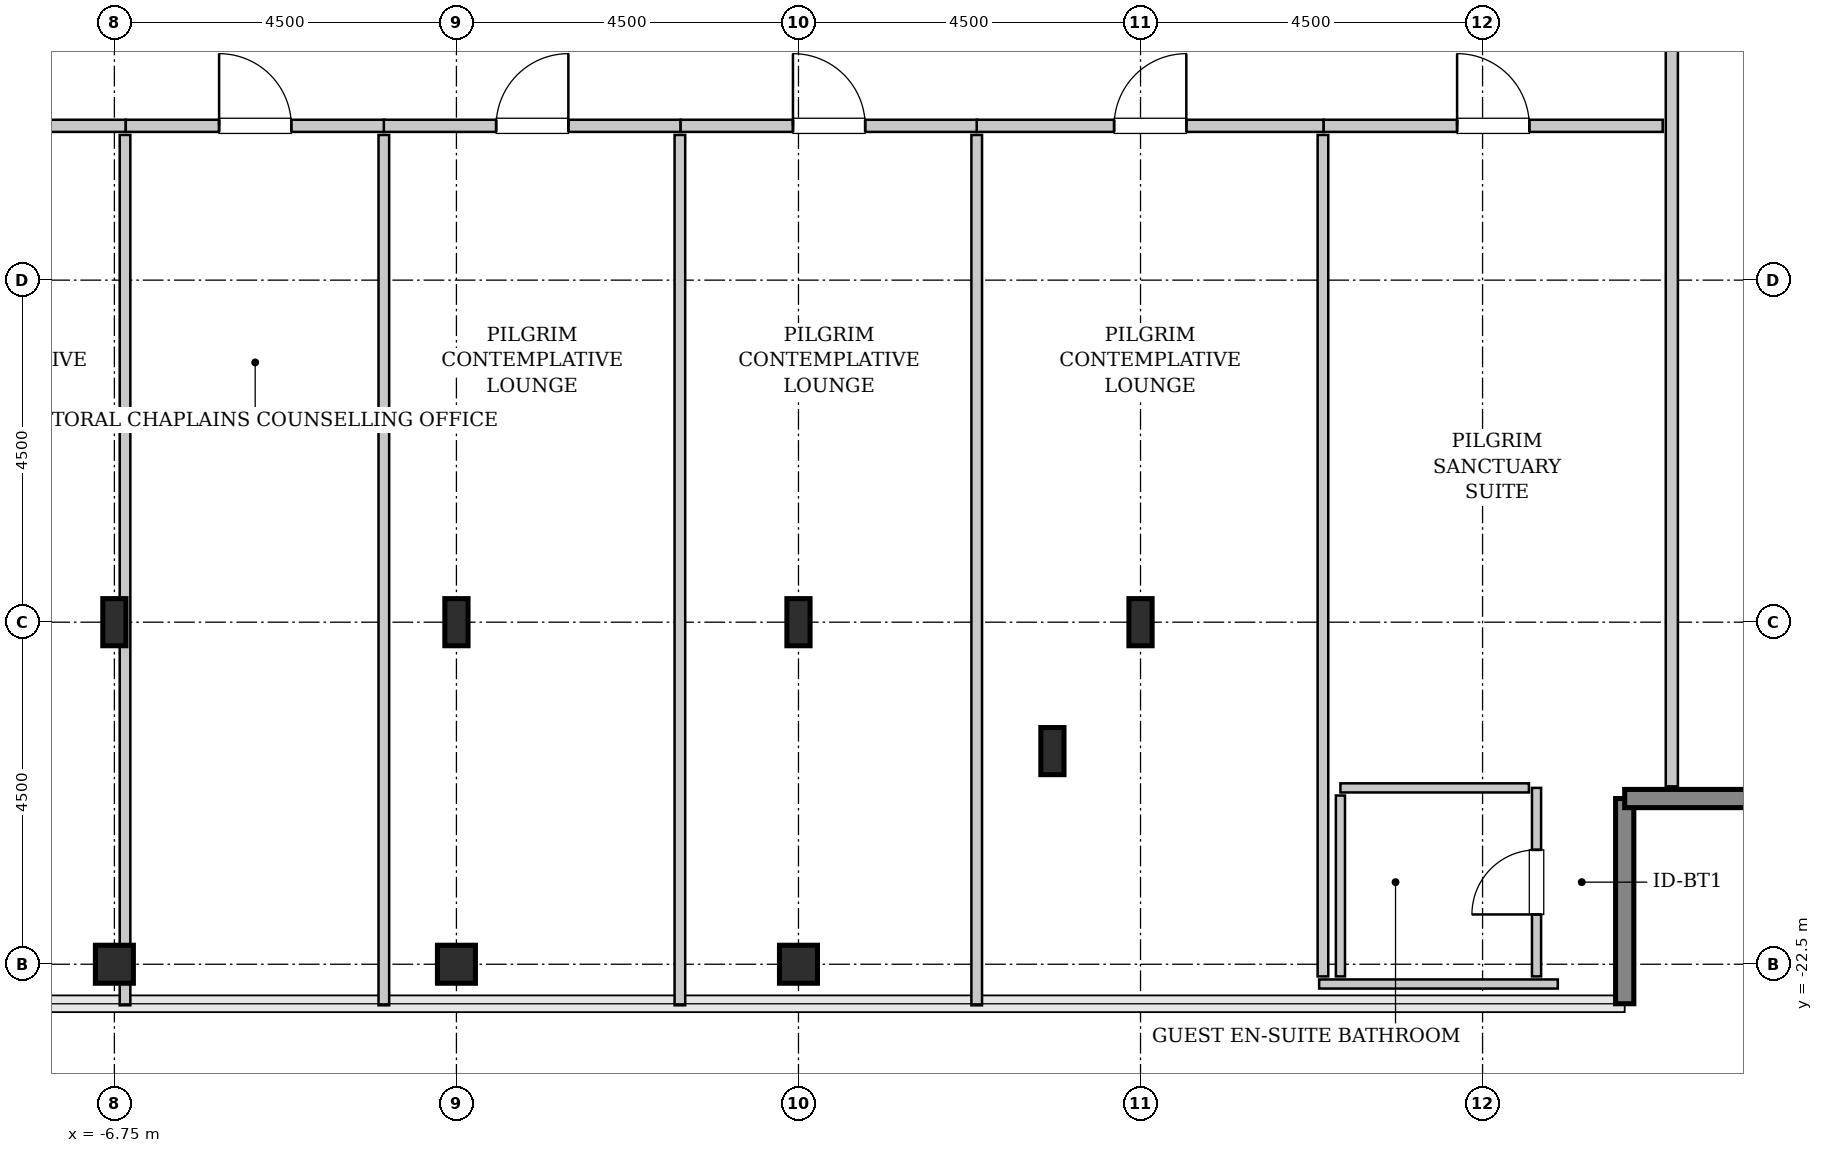
"""IFC4 building model, lengths in metres.
Left out: names, types, materials, properties, quantities, classifications, styles, units other than length and angle.
Written with IfcOpenShell. Run it as: python <this file> out.ifc"""

import sys

from ifc_helpers import new_model, si_unit, direction, frame, frame_2d, origin, origin_2d, place, context, subcontext, project, spatial, rectangle, hollow_rectangle, i_section, extrude, source, transform, mapped, element, fill, save


model = new_model("IFC4")
c1 = context("Model", 3, precision=1e-05, world=origin(), true_north=direction((0.0, 1.0)))
c2 = subcontext(c1, "Body", "Model", "MODEL_VIEW")
j1 = project(units=[si_unit("LENGTHUNIT", "METRE"), si_unit("PLANEANGLEUNIT", "RADIAN")], contexts=[c1])
p1 = place(None, origin())
s1 = spatial("IfcSite", under=j1, at=p1, CompositionType="ELEMENT")
p2 = place(p1, origin())
s2 = spatial("IfcBuilding", under=s1, at=p2, CompositionType="ELEMENT")
p3 = place(p2, frame((0.0, 0.0, 314.0)))
s3 = spatial("IfcBuildingStorey", under=s2, at=p3, CompositionType="ELEMENT", Elevation=314.0)
m1 = source(origin(), c2, "Body", "SweptSolid", [
    extrude(hollow_rectangle(XDim=0.5, YDim=0.5, WallThickness=0.025, InnerFilletRadius=0.025, OuterFilletRadius=0.05, at=origin_2d()), origin(), (0.0, 0.0, 1.0), 3.8),
])
p4 = place(p3, frame((-6.75, -22.5, 0.0), z_axis=(0.0, 0.0, 1.0), x_axis=(1.0, 0.0, 0.0)))
e1 = element("IfcColumn", 1, at=p4, inside=s3, PredefinedType="COLUMN", context=c2, shape_type="MappedRepresentation", body=[
    mapped(m1, transform((0.0, 0.0, 0.0), x_axis=(1.0, 0.0, 0.0), y_axis=(0.0, 1.0, 0.0), z_axis=(0.0, 0.0, 1.0), scale=1.0)),
])
m2 = source(origin(), c2, "Body", "SweptSolid", [
    extrude(i_section(OverallWidth=0.305, OverallDepth=0.62, WebThickness=0.021, FlangeThickness=0.04, FilletRadius=0.027, at=origin_2d()), origin(), (0.0, 0.0, 1.0), 3.8),
])
p5 = place(p3, frame((-6.75, -18.0, 0.0), z_axis=(0.0, 0.0, 1.0), x_axis=(1.0, 0.0, 0.0)))
e2 = element("IfcColumn", 2, at=p5, inside=s3, PredefinedType="COLUMN", context=c2, shape_type="MappedRepresentation", body=[
    mapped(m2, transform((0.0, 0.0, 0.0), x_axis=(1.0, 0.0, 0.0), y_axis=(0.0, 1.0, 0.0), z_axis=(0.0, 0.0, 1.0), scale=1.0)),
])
p6 = place(p3, frame((-2.25, -22.5, 0.0), z_axis=(0.0, 0.0, 1.0), x_axis=(1.0, 0.0, 0.0)))
e3 = element("IfcColumn", 3, at=p6, inside=s3, PredefinedType="COLUMN", context=c2, shape_type="MappedRepresentation", body=[
    mapped(m1, transform((0.0, 0.0, 0.0), x_axis=(1.0, 0.0, 0.0), y_axis=(0.0, 1.0, 0.0), z_axis=(0.0, 0.0, 1.0), scale=1.0)),
])
p7 = place(p3, frame((-2.25, -18.0, 0.0), z_axis=(0.0, 0.0, 1.0), x_axis=(1.0, 0.0, 0.0)))
e4 = element("IfcColumn", 4, at=p7, inside=s3, PredefinedType="COLUMN", context=c2, shape_type="MappedRepresentation", body=[
    mapped(m2, transform((0.0, 0.0, 0.0), x_axis=(1.0, 0.0, 0.0), y_axis=(0.0, 1.0, 0.0), z_axis=(0.0, 0.0, 1.0), scale=1.0)),
])
p8 = place(p3, frame((2.25, -22.5, 0.0), z_axis=(0.0, 0.0, 1.0), x_axis=(1.0, 0.0, 0.0)))
e5 = element("IfcColumn", 5, at=p8, inside=s3, PredefinedType="COLUMN", context=c2, shape_type="MappedRepresentation", body=[
    mapped(m1, transform((0.0, 0.0, 0.0), x_axis=(1.0, 0.0, 0.0), y_axis=(0.0, 1.0, 0.0), z_axis=(0.0, 0.0, 1.0), scale=1.0)),
])
for number, where, z_axis, x_axis in (
    (6, (2.25, -18.0, 0.0), (0.0, 0.0, 1.0), (1.0, 0.0, 0.0)),
    (7, (5.591, -19.696, 0.0), (0.0, 0.0, 1.0), (1.0, 0.0, 0.0)),
    (8, (6.75, -18.0, 0.0), (0.0, 0.0, 1.0), (1.0, 0.0, 0.0)),
):
    element("IfcColumn", number, at=place(p3, frame(where, z_axis=z_axis, x_axis=x_axis)), inside=s3, PredefinedType="COLUMN", context=c2, shape_type="MappedRepresentation", body=[
        mapped(m2, transform((0.0, 0.0, 0.0), x_axis=(1.0, 0.0, 0.0), y_axis=(0.0, 1.0, 0.0), z_axis=(0.0, 0.0, 1.0), scale=1.0)),
    ])
m3 = source(origin(), c2, "Body", "SweptSolid", [
    extrude(rectangle(XDim=2.7, YDim=0.24, at=frame_2d((1.35, 0.0))), origin(), (0.0, 0.0, 1.0), 3.5),
])
for number, where, z_axis, x_axis in (
    (9, (13.12, -23.02, 0.0), (0.0, 0.0, 1.0), (0.0, 1.0, 0.0)),
    (10, (13.12, -20.32, 0.0), (0.0, 0.0, 1.0), (1.0, 0.0, 0.0)),
):
    element("IfcWall", number, at=place(p3, frame(where, z_axis=z_axis, x_axis=x_axis)), inside=s3, PredefinedType="SHEAR", context=c2, shape_type="MappedRepresentation", body=[
        mapped(m3, transform((0.0, 0.0, 0.0), x_axis=(1.0, 0.0, 0.0), y_axis=(0.0, 1.0, 0.0), z_axis=(0.0, 0.0, 1.0), scale=1.0)),
    ])
m4 = source(origin(), c2, "Body", "SweptSolid", [
    extrude(rectangle(XDim=3.14, YDim=0.12, at=frame_2d((1.57, 0.0))), origin(), (0.0, 0.0, 1.0), 3.485),
])
p9 = place(p3, frame((9.1, -22.76, 0.0), z_axis=(0.0, 0.0, 1.0), x_axis=(1.0, 0.0, 0.0)))
e11 = element("IfcWall", 11, at=p9, inside=s3, PredefinedType="PLUMBINGWALL", context=c2, shape_type="MappedRepresentation", body=[
    mapped(m4, transform((0.0, 0.0, 0.0), x_axis=(1.0, 0.0, 0.0), y_axis=(0.0, 1.0, 0.0), z_axis=(0.0, 0.0, 1.0), scale=1.0)),
])
m5 = source(origin(), c2, "Body", "SweptSolid", [
    extrude(rectangle(XDim=2.48, YDim=0.12, at=frame_2d((1.24, 0.0))), origin(), (0.0, 0.0, 1.0), 3.485),
])
p10 = place(p3, frame((11.96, -22.66, 0.0), z_axis=(0.0, 0.0, 1.0), x_axis=(0.0, 1.0, 0.0)))
e12 = element("IfcWall", 12, at=p10, inside=s3, PredefinedType="PLUMBINGWALL", context=c2, shape_type="MappedRepresentation", body=[
    mapped(m5, transform((0.0, 0.0, 0.0), x_axis=(1.0, 0.0, 0.0), y_axis=(0.0, 1.0, 0.0), z_axis=(0.0, 0.0, 1.0), scale=1.0)),
])
p11 = place(p10, frame((0.815, 0.0, 0.0)))
e13 = element("IfcOpeningElement", 13, at=p11, cuts=e12, PredefinedType="OPENING", context=c2, shape_type="SweptSolid", body=[
    extrude(rectangle(XDim=0.85, YDim=2.1, at=frame_2d((0.425, 1.05))), frame((0.0, 0.07, 0.0), z_axis=(0.0, -1.0, 0.0), x_axis=(1.0, 0.0, 0.0)), (0.0, 0.0, 1.0), 0.14),
])
m6 = source(origin(), c2, "Body", "SweptSolid", [
    extrude(rectangle(XDim=2.48, YDim=0.12, at=frame_2d((1.24, 0.0))), origin(), (0.0, 0.0, 1.0), 3.485),
])
p12 = place(p3, frame((9.38, -20.18, 0.0), z_axis=(0.0, 0.0, 1.0), x_axis=(1.0, 0.0, 0.0)))
e14 = element("IfcWall", 14, at=p12, inside=s3, PredefinedType="PLUMBINGWALL", context=c2, shape_type="MappedRepresentation", body=[
    mapped(m6, transform((0.0, 0.0, 0.0), x_axis=(1.0, 0.0, 0.0), y_axis=(0.0, 1.0, 0.0), z_axis=(0.0, 0.0, 1.0), scale=1.0)),
])
m7 = source(origin(), c2, "Body", "SweptSolid", [
    extrude(rectangle(XDim=2.38, YDim=0.12, at=frame_2d((1.19, 0.0))), origin(), (0.0, 0.0, 1.0), 3.485),
])
p13 = place(p3, frame((9.38, -22.66, 0.0), z_axis=(0.0, 0.0, 1.0), x_axis=(0.0, 1.0, 0.0)))
e15 = element("IfcWall", 15, at=p13, inside=s3, PredefinedType="PLUMBINGWALL", context=c2, shape_type="MappedRepresentation", body=[
    mapped(m7, transform((0.0, 0.0, 0.0), x_axis=(1.0, 0.0, 0.0), y_axis=(0.0, 1.0, 0.0), z_axis=(0.0, 0.0, 1.0), scale=1.0)),
])
m8 = source(origin(), c2, "Body", "SweptSolid", [
    extrude(rectangle(XDim=11.965, YDim=0.16, at=frame_2d((5.982, 0.0))), origin(), (0.0, 0.0, 1.0), 3.485),
])
p14 = place(p3, frame((13.74, -20.16, 0.0), z_axis=(0.0, 0.0, 1.0), x_axis=(0.0, 1.0, 0.0)))
e16 = element("IfcWall", 16, at=p14, inside=s3, PredefinedType="PARTITIONING", context=c2, shape_type="MappedRepresentation", body=[
    mapped(m8, transform((0.0, 0.0, 0.0), x_axis=(1.0, 0.0, 0.0), y_axis=(0.0, 1.0, 0.0), z_axis=(0.0, 0.0, 1.0), scale=1.0)),
])
p15 = place(p14, frame((9.833, 0.0, 0.0)))
e17 = element("IfcOpeningElement", 17, at=p15, cuts=e16, PredefinedType="OPENING", context=c2, shape_type="SweptSolid", body=[
    extrude(rectangle(XDim=0.95, YDim=2.1, at=frame_2d((0.475, 1.05))), frame((0.0, 0.09, 0.0), z_axis=(0.0, -1.0, 0.0), x_axis=(1.0, 0.0, 0.0)), (0.0, 0.0, 1.0), 0.18),
])
m9 = source(origin(), c2, "Body", "SweptSolid", [
    extrude(rectangle(XDim=3.405, YDim=0.16, at=frame_2d((1.702, 0.0))), origin(), (0.0, 0.0, 1.0), 3.485),
])
p16 = place(p3, frame((-10.005, -11.47, 0.0), z_axis=(0.0, 0.0, 1.0), x_axis=(1.0, 0.0, 0.0)))
e18 = element("IfcWall", 18, at=p16, inside=s3, PredefinedType="PARTITIONING", context=c2, shape_type="MappedRepresentation", body=[
    mapped(m9, transform((0.0, 0.0, 0.0), x_axis=(1.0, 0.0, 0.0), y_axis=(0.0, 1.0, 0.0), z_axis=(0.0, 0.0, 1.0), scale=1.0)),
])
p17 = place(p16, frame((1.228, 0.0, 0.0)))
e19 = element("IfcOpeningElement", 19, at=p17, cuts=e18, PredefinedType="OPENING", context=c2, shape_type="SweptSolid", body=[
    extrude(rectangle(XDim=0.95, YDim=2.1, at=frame_2d((0.475, 1.05))), frame((0.0, 0.09, 0.0), z_axis=(0.0, -1.0, 0.0), x_axis=(1.0, 0.0, 0.0)), (0.0, 0.0, 1.0), 0.18),
])
m10 = source(origin(), c2, "Body", "SweptSolid", [
    extrude(rectangle(XDim=11.45, YDim=0.14, at=frame_2d((5.725, 0.0))), origin(), (0.0, 0.0, 1.0), 2.925),
])
p18 = place(p3, frame((-6.61, -23.04, 0.0), z_axis=(0.0, 0.0, 1.0), x_axis=(0.0, 1.0, 0.0)))
e20 = element("IfcWall", 20, at=p18, inside=s3, PredefinedType="PARTITIONING", context=c2, shape_type="MappedRepresentation", body=[
    mapped(m10, transform((0.0, 0.0, 0.0), x_axis=(1.0, 0.0, 0.0), y_axis=(0.0, 1.0, 0.0), z_axis=(0.0, 0.0, 1.0), scale=1.0)),
])
m11 = source(origin(), c2, "Body", "SweptSolid", [
    extrude(rectangle(XDim=3.405, YDim=0.16, at=frame_2d((1.703, 0.0))), origin(), (0.0, 0.0, 1.0), 3.485),
])
p19 = place(p3, frame((-6.6, -11.47, 0.0), z_axis=(0.0, 0.0, 1.0), x_axis=(1.0, 0.0, 0.0)))
e21 = element("IfcWall", 21, at=p19, inside=s3, PredefinedType="PARTITIONING", context=c2, shape_type="MappedRepresentation", body=[
    mapped(m11, transform((0.0, 0.0, 0.0), x_axis=(1.0, 0.0, 0.0), y_axis=(0.0, 1.0, 0.0), z_axis=(0.0, 0.0, 1.0), scale=1.0)),
])
p20 = place(p19, frame((1.228, 0.0, 0.0)))
e22 = element("IfcOpeningElement", 22, at=p20, cuts=e21, PredefinedType="OPENING", context=c2, shape_type="SweptSolid", body=[
    extrude(rectangle(XDim=0.95, YDim=2.1, at=frame_2d((0.475, 1.05))), frame((0.0, 0.09, 0.0), z_axis=(0.0, -1.0, 0.0), x_axis=(1.0, 0.0, 0.0)), (0.0, 0.0, 1.0), 0.18),
])
m12 = source(origin(), c2, "Body", "SweptSolid", [
    extrude(rectangle(XDim=11.45, YDim=0.14, at=frame_2d((5.725, 0.0))), origin(), (0.0, 0.0, 1.0), 3.485),
])
p21 = place(p3, frame((-3.205, -23.04, 0.0), z_axis=(0.0, 0.0, 1.0), x_axis=(0.0, 1.0, 0.0)))
e23 = element("IfcWall", 23, at=p21, inside=s3, PredefinedType="PARTITIONING", context=c2, shape_type="MappedRepresentation", body=[
    mapped(m12, transform((0.0, 0.0, 0.0), x_axis=(1.0, 0.0, 0.0), y_axis=(0.0, 1.0, 0.0), z_axis=(0.0, 0.0, 1.0), scale=1.0)),
])
m13 = source(origin(), c2, "Body", "SweptSolid", [
    extrude(rectangle(XDim=3.905, YDim=0.16, at=frame_2d((1.953, 0.0))), origin(), (0.0, 0.0, 1.0), 3.485),
])
p22 = place(p3, frame((-3.205, -11.47, 0.0), z_axis=(0.0, 0.0, 1.0), x_axis=(1.0, 0.0, 0.0)))
e24 = element("IfcWall", 24, at=p22, inside=s3, PredefinedType="PARTITIONING", context=c2, shape_type="MappedRepresentation", body=[
    mapped(m13, transform((0.0, 0.0, 0.0), x_axis=(1.0, 0.0, 0.0), y_axis=(0.0, 1.0, 0.0), z_axis=(0.0, 0.0, 1.0), scale=1.0)),
])
p23 = place(p22, frame((1.478, 0.0, 0.0)))
e25 = element("IfcOpeningElement", 25, at=p23, cuts=e24, PredefinedType="OPENING", context=c2, shape_type="SweptSolid", body=[
    extrude(rectangle(XDim=0.95, YDim=2.1, at=frame_2d((0.475, 1.05))), frame((0.0, 0.09, 0.0), z_axis=(0.0, -1.0, 0.0), x_axis=(1.0, 0.0, 0.0)), (0.0, 0.0, 1.0), 0.18),
])
p24 = place(p3, frame((0.69, -23.04, 0.0), z_axis=(0.0, 0.0, 1.0), x_axis=(0.0, 1.0, 0.0)))
e26 = element("IfcWall", 26, at=p24, inside=s3, PredefinedType="PARTITIONING", context=c2, shape_type="MappedRepresentation", body=[
    mapped(m12, transform((0.0, 0.0, 0.0), x_axis=(1.0, 0.0, 0.0), y_axis=(0.0, 1.0, 0.0), z_axis=(0.0, 0.0, 1.0), scale=1.0)),
])
p25 = place(p3, frame((0.7, -11.47, 0.0), z_axis=(0.0, 0.0, 1.0), x_axis=(1.0, 0.0, 0.0)))
e27 = element("IfcWall", 27, at=p25, inside=s3, PredefinedType="PARTITIONING", context=c2, shape_type="MappedRepresentation", body=[
    mapped(m13, transform((0.0, 0.0, 0.0), x_axis=(1.0, 0.0, 0.0), y_axis=(0.0, 1.0, 0.0), z_axis=(0.0, 0.0, 1.0), scale=1.0)),
])
p26 = place(p25, frame((1.478, 0.0, 0.0)))
e28 = element("IfcOpeningElement", 28, at=p26, cuts=e27, PredefinedType="OPENING", context=c2, shape_type="SweptSolid", body=[
    extrude(rectangle(XDim=0.95, YDim=2.1, at=frame_2d((0.475, 1.05))), frame((0.0, 0.09, 0.0), z_axis=(0.0, -1.0, 0.0), x_axis=(1.0, 0.0, 0.0)), (0.0, 0.0, 1.0), 0.18),
])
p27 = place(p3, frame((4.595, -23.04, 0.0), z_axis=(0.0, 0.0, 1.0), x_axis=(0.0, 1.0, 0.0)))
e29 = element("IfcWall", 29, at=p27, inside=s3, PredefinedType="PARTITIONING", context=c2, shape_type="MappedRepresentation", body=[
    mapped(m12, transform((0.0, 0.0, 0.0), x_axis=(1.0, 0.0, 0.0), y_axis=(0.0, 1.0, 0.0), z_axis=(0.0, 0.0, 1.0), scale=1.0)),
])
m14 = source(origin(), c2, "Body", "SweptSolid", [
    extrude(rectangle(XDim=4.565, YDim=0.16, at=frame_2d((2.282, 0.0))), origin(), (0.0, 0.0, 1.0), 3.485),
])
p28 = place(p3, frame((4.595, -11.47, 0.0), z_axis=(0.0, 0.0, 1.0), x_axis=(1.0, 0.0, 0.0)))
e30 = element("IfcWall", 30, at=p28, inside=s3, PredefinedType="PARTITIONING", context=c2, shape_type="MappedRepresentation", body=[
    mapped(m14, transform((0.0, 0.0, 0.0), x_axis=(1.0, 0.0, 0.0), y_axis=(0.0, 1.0, 0.0), z_axis=(0.0, 0.0, 1.0), scale=1.0)),
])
p29 = place(p28, frame((1.808, 0.0, 0.0)))
e31 = element("IfcOpeningElement", 31, at=p29, cuts=e30, PredefinedType="OPENING", context=c2, shape_type="SweptSolid", body=[
    extrude(rectangle(XDim=0.95, YDim=2.1, at=frame_2d((0.475, 1.05))), frame((0.0, 0.09, 0.0), z_axis=(0.0, -1.0, 0.0), x_axis=(1.0, 0.0, 0.0)), (0.0, 0.0, 1.0), 0.18),
])
m15 = source(origin(), c2, "Body", "SweptSolid", [
    extrude(rectangle(XDim=11.07, YDim=0.14, at=frame_2d((5.535, 0.0))), origin(), (0.0, 0.0, 1.0), 3.485),
])
p30 = place(p3, frame((9.15, -22.66, 0.0), z_axis=(0.0, 0.0, 1.0), x_axis=(0.0, 1.0, 0.0)))
e32 = element("IfcWall", 32, at=p30, inside=s3, PredefinedType="PARTITIONING", context=c2, shape_type="MappedRepresentation", body=[
    mapped(m15, transform((0.0, 0.0, 0.0), x_axis=(1.0, 0.0, 0.0), y_axis=(0.0, 1.0, 0.0), z_axis=(0.0, 0.0, 1.0), scale=1.0)),
])
m16 = source(origin(), c2, "Body", "SweptSolid", [
    extrude(rectangle(XDim=4.46, YDim=0.16, at=frame_2d((2.23, 0.0))), origin(), (0.0, 0.0, 1.0), 3.485),
])
p31 = place(p3, frame((9.16, -11.47, 0.0), z_axis=(0.0, 0.0, 1.0), x_axis=(1.0, 0.0, 0.0)))
e33 = element("IfcWall", 33, at=p31, inside=s3, PredefinedType="PARTITIONING", context=c2, shape_type="MappedRepresentation", body=[
    mapped(m16, transform((0.0, 0.0, 0.0), x_axis=(1.0, 0.0, 0.0), y_axis=(0.0, 1.0, 0.0), z_axis=(0.0, 0.0, 1.0), scale=1.0)),
])
p32 = place(p31, frame((1.755, 0.0, 0.0)))
e34 = element("IfcOpeningElement", 34, at=p32, cuts=e33, PredefinedType="OPENING", context=c2, shape_type="SweptSolid", body=[
    extrude(rectangle(XDim=0.95, YDim=2.1, at=frame_2d((0.475, 1.05))), frame((0.0, 0.09, 0.0), z_axis=(0.0, -1.0, 0.0), x_axis=(1.0, 0.0, 0.0)), (0.0, 0.0, 1.0), 0.18),
])
m17 = source(origin(), c2, "Body", "SweptSolid", [
    extrude(rectangle(XDim=0.85, YDim=2.1, at=frame_2d((0.425, 1.05))), frame((0.0, 0.025, 0.0), z_axis=(0.0, -1.0, 0.0), x_axis=(1.0, 0.0, 0.0)), (0.0, 0.0, 1.0), 0.05),
])
p33 = place(p11, origin())
e35 = element("IfcDoor", 35, at=p33, inside=s3, OperationType="SINGLE_SWING_LEFT", PredefinedType="DOOR", context=c2, shape_type="MappedRepresentation", body=[
    mapped(m17, transform((0.0, 0.0, 0.0), x_axis=(1.0, 0.0, 0.0), y_axis=(0.0, 1.0, 0.0), z_axis=(0.0, 0.0, 1.0), scale=1.0)),
])
fill(e13, e35)
m18 = source(origin(), c2, "Body", "SweptSolid", [
    extrude(rectangle(XDim=0.95, YDim=2.1, at=frame_2d((0.475, 1.05))), frame((0.0, 0.025, 0.0), z_axis=(0.0, -1.0, 0.0), x_axis=(1.0, 0.0, 0.0)), (0.0, 0.0, 1.0), 0.05),
])
p34 = place(p20, origin())
e36 = element("IfcDoor", 36, at=p34, inside=s3, OperationType="SINGLE_SWING_LEFT", PredefinedType="DOOR", context=c2, shape_type="MappedRepresentation", body=[
    mapped(m18, transform((0.0, 0.0, 0.0), x_axis=(1.0, 0.0, 0.0), y_axis=(0.0, 1.0, 0.0), z_axis=(0.0, 0.0, 1.0), scale=1.0)),
])
fill(e22, e36)
p35 = place(p23, origin())
e37 = element("IfcDoor", 37, at=p35, inside=s3, OperationType="SINGLE_SWING_RIGHT", PredefinedType="DOOR", context=c2, shape_type="MappedRepresentation", body=[
    mapped(m18, transform((0.0, 0.0, 0.0), x_axis=(1.0, 0.0, 0.0), y_axis=(0.0, 1.0, 0.0), z_axis=(0.0, 0.0, 1.0), scale=1.0)),
])
fill(e25, e37)
p36 = place(p26, origin())
e38 = element("IfcDoor", 38, at=p36, inside=s3, OperationType="SINGLE_SWING_LEFT", PredefinedType="DOOR", context=c2, shape_type="MappedRepresentation", body=[
    mapped(m18, transform((0.0, 0.0, 0.0), x_axis=(1.0, 0.0, 0.0), y_axis=(0.0, 1.0, 0.0), z_axis=(0.0, 0.0, 1.0), scale=1.0)),
])
fill(e28, e38)
p37 = place(p29, origin())
e39 = element("IfcDoor", 39, at=p37, inside=s3, OperationType="SINGLE_SWING_RIGHT", PredefinedType="DOOR", context=c2, shape_type="MappedRepresentation", body=[
    mapped(m18, transform((0.0, 0.0, 0.0), x_axis=(1.0, 0.0, 0.0), y_axis=(0.0, 1.0, 0.0), z_axis=(0.0, 0.0, 1.0), scale=1.0)),
])
fill(e31, e39)
p38 = place(p32, origin())
e40 = element("IfcDoor", 40, at=p38, inside=s3, OperationType="SINGLE_SWING_LEFT", PredefinedType="DOOR", context=c2, shape_type="MappedRepresentation", body=[
    mapped(m18, transform((0.0, 0.0, 0.0), x_axis=(1.0, 0.0, 0.0), y_axis=(0.0, 1.0, 0.0), z_axis=(0.0, 0.0, 1.0), scale=1.0)),
])
fill(e34, e40)
save(model, sys.argv[1])
